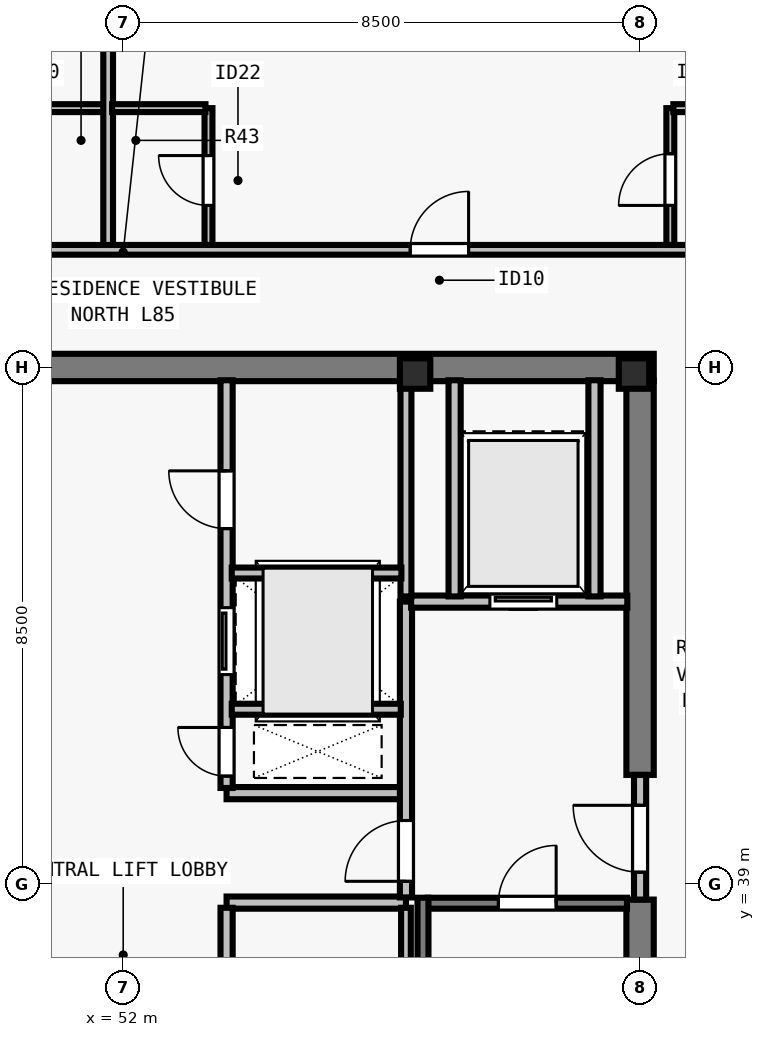
"""IFC4 building model, lengths in metres.
Left out: names, types, materials, properties, quantities, classifications, styles, units other than length and angle.
Written with IfcOpenShell. Run it as: python <this file> out.ifc"""

import sys

from ifc_helpers import new_model, si_unit, direction, frame, frame_2d, origin, origin_2d, place, context, subcontext, project, spatial, rectangle, i_section, extrude, element, fill, save


model = new_model("IFC4")
c1 = context("Model", 3, precision=1e-05, world=origin(), true_north=direction((0.0, 1.0)))
c2 = subcontext(c1, "Body", "Model", "MODEL_VIEW")
j1 = project(units=[si_unit("LENGTHUNIT", "METRE"), si_unit("PLANEANGLEUNIT", "RADIAN")], contexts=[c1])
p1 = place(None, origin())
s1 = spatial("IfcSite", under=j1, at=p1, CompositionType="ELEMENT")
p2 = place(p1, origin())
s2 = spatial("IfcBuilding", under=s1, at=p2, CompositionType="ELEMENT")
p3 = place(p2, frame((0.0, 0.0, 308.5)))
s3 = spatial("IfcBuildingStorey", under=s2, at=p3, CompositionType="ELEMENT", Elevation=308.5)
for number, where, z_axis, x_axis in (
    (1, (56.8, 47.4, 0.0), (0.0, 0.0, 1.0), (1.0, 0.0, 0.0)),
    (2, (60.4, 47.4, 0.0), (0.0, 0.0, 1.0), (1.0, 0.0, 0.0)),
):
    element("IfcColumn", number, at=place(p3, frame(where, z_axis=z_axis, x_axis=x_axis)), inside=s3, PredefinedType="COLUMN", context=c2, shape_type="SweptSolid", body=[
        extrude(i_section(OverallWidth=0.5, OverallDepth=0.5, WebThickness=0.028, FlangeThickness=0.045, at=origin_2d()), origin(), (0.0, 0.0, 1.0), 3.5),
    ])
p4 = place(p3, frame((43.275, 47.5, 0.0), z_axis=(0.0, 0.0, 1.0), x_axis=(1.0, 0.0, 0.0)))
e3 = element("IfcWall", 3, at=p4, inside=s3, PredefinedType="SHEAR", context=c2, shape_type="SweptSolid", body=[
    extrude(rectangle(XDim=17.45, YDim=0.45, at=frame_2d((8.725, 0.0))), origin(), (0.0, 0.0, 1.0), 3.29),
])
p5 = place(p3, frame((60.5, 30.715, 0.0), z_axis=(0.0, 0.0, 1.0), x_axis=(0.0, 1.0, 0.0)))
e4 = element("IfcWall", 4, at=p5, inside=s3, PredefinedType="SHEAR", context=c2, shape_type="SweptSolid", body=[
    extrude(rectangle(XDim=8.035, YDim=0.45, at=frame_2d((4.018, 0.0))), origin(), (0.0, 0.0, 1.0), 3.29),
])
p6 = place(p3, frame((60.5, 40.8, 0.0), z_axis=(0.0, 0.0, 1.0), x_axis=(0.0, 1.0, 0.0)))
e5 = element("IfcWall", 5, at=p6, inside=s3, PredefinedType="SHEAR", context=c2, shape_type="SweptSolid", body=[
    extrude(rectangle(XDim=6.485, YDim=0.45, at=frame_2d((3.242, 0.0))), origin(), (0.0, 0.0, 1.0), 3.29),
])
for number, where, z_axis, x_axis in (
    (6, (53.7, 38.7, 0.0), (0.0, 0.0, 1.0), (1.0, 0.0, 0.0)),
    (7, (53.7, 40.5, 0.0), (0.0, 0.0, 1.0), (1.0, 0.0, 0.0)),
):
    element("IfcWall", number, at=place(p3, frame(where, z_axis=z_axis, x_axis=x_axis)), inside=s3, PredefinedType="SOLIDWALL", context=c2, shape_type="SweptSolid", body=[
        extrude(rectangle(XDim=2.95, YDim=0.2, at=frame_2d((1.475, 0.0))), origin(), (0.0, 0.0, 1.0), 3.29),
    ])
p7 = place(p3, frame((53.7, 30.71, 0.0), z_axis=(0.0, 0.0, 1.0), x_axis=(0.0, 1.0, 0.0)))
e8 = element("IfcWall", 8, at=p7, inside=s3, PredefinedType="SOLIDWALL", context=c2, shape_type="SweptSolid", body=[
    extrude(rectangle(XDim=7.905, YDim=0.2, at=frame_2d((3.953, 0.0))), origin(), (0.0, 0.0, 1.0), 3.29),
])
p8 = place(p7, frame((3.14, 0.0, 0.0)))
e9 = element("IfcOpeningElement", 9, at=p8, cuts=e8, PredefinedType="OPENING", context=c2, shape_type="SweptSolid", body=[
    extrude(rectangle(XDim=0.9, YDim=2.12, at=frame_2d((0.45, 1.06))), frame((0.0, 0.11, 0.0), z_axis=(0.0, -1.0, 0.0), x_axis=(1.0, 0.0, 0.0)), (0.0, 0.0, 1.0), 0.22),
])
p9 = place(p3, frame((53.7, 40.585, 0.0), z_axis=(0.0, 0.0, 1.0), x_axis=(0.0, 1.0, 0.0)))
e10 = element("IfcWall", 10, at=p9, inside=s3, PredefinedType="SOLIDWALL", context=c2, shape_type="SweptSolid", body=[
    extrude(rectangle(XDim=6.705, YDim=0.2, at=frame_2d((3.353, 0.0))), origin(), (0.0, 0.0, 1.0), 3.29),
])
p10 = place(p9, frame((0.195, 0.0, 0.0)))
e11 = element("IfcOpeningElement", 11, at=p10, cuts=e10, PredefinedType="OPENING", context=c2, shape_type="SweptSolid", body=[
    extrude(rectangle(XDim=0.8, YDim=2.08, at=frame_2d((0.4, 1.04))), frame((0.0, 0.11, 0.0), z_axis=(0.0, -1.0, 0.0), x_axis=(1.0, 0.0, 0.0)), (0.0, 0.0, 1.0), 0.22),
])
p11 = place(p9, frame((1.865, 0.0, 0.0)))
e12 = element("IfcOpeningElement", 12, at=p11, cuts=e10, PredefinedType="OPENING", context=c2, shape_type="SweptSolid", body=[
    extrude(rectangle(XDim=1.1, YDim=2.2, at=frame_2d((0.55, 1.1))), frame((0.0, 0.11, 0.0), z_axis=(0.0, -1.0, 0.0), x_axis=(1.0, 0.0, 0.0)), (0.0, 0.0, 1.0), 0.22),
])
p12 = place(p9, frame((4.265, 0.0, 0.0)))
e13 = element("IfcOpeningElement", 13, at=p12, cuts=e10, PredefinedType="OPENING", context=c2, shape_type="SweptSolid", body=[
    extrude(rectangle(XDim=0.95, YDim=2.12, at=frame_2d((0.475, 1.06))), frame((0.0, 0.11, 0.0), z_axis=(0.0, -1.0, 0.0), x_axis=(1.0, 0.0, 0.0)), (0.0, 0.0, 1.0), 0.22),
])
p13 = place(p3, frame((60.5, 38.75, 0.0), z_axis=(0.0, 0.0, 1.0), x_axis=(0.0, 1.0, 0.0)))
e14 = element("IfcWall", 14, at=p13, inside=s3, PredefinedType="SOLIDWALL", context=c2, shape_type="SweptSolid", body=[
    extrude(rectangle(XDim=2.05, YDim=0.2, at=frame_2d((1.025, 0.0))), origin(), (0.0, 0.0, 1.0), 3.29),
])
p14 = place(p13, frame((0.45, 0.0, 0.0)))
e15 = element("IfcOpeningElement", 15, at=p14, cuts=e14, PredefinedType="OPENING", context=c2, shape_type="SweptSolid", body=[
    extrude(rectangle(XDim=1.1, YDim=2.15, at=frame_2d((0.55, 1.075))), frame((0.0, 0.11, 0.0), z_axis=(0.0, -1.0, 0.0), x_axis=(1.0, 0.0, 0.0)), (0.0, 0.0, 1.0), 0.22),
])
p15 = place(p3, frame((56.65, 38.785, 0.0), z_axis=(0.0, 0.0, 1.0), x_axis=(0.0, 1.0, 0.0)))
e16 = element("IfcWall", 16, at=p15, inside=s3, PredefinedType="SOLIDWALL", context=c2, shape_type="SweptSolid", body=[
    extrude(rectangle(XDim=4.865, YDim=0.2, at=frame_2d((2.433, 0.0))), origin(), (0.0, 0.0, 1.0), 3.29),
])
p16 = place(p15, frame((0.265, 0.0, 0.0)))
e17 = element("IfcOpeningElement", 17, at=p16, cuts=e16, PredefinedType="OPENING", context=c2, shape_type="SweptSolid", body=[
    extrude(rectangle(XDim=1.0, YDim=2.15, at=frame_2d((0.5, 1.075))), frame((0.0, 0.11, 0.0), z_axis=(0.0, -1.0, 0.0), x_axis=(1.0, 0.0, 0.0)), (0.0, 0.0, 1.0), 0.22),
])
p17 = place(p3, frame((56.735, 43.65, 0.0), z_axis=(0.0, 0.0, 1.0), x_axis=(1.0, 0.0, 0.0)))
e18 = element("IfcWall", 18, at=p17, inside=s3, PredefinedType="SOLIDWALL", context=c2, shape_type="SweptSolid", body=[
    extrude(rectangle(XDim=3.555, YDim=0.2, at=frame_2d((1.777, 0.0))), origin(), (0.0, 0.0, 1.0), 3.29),
])
p18 = place(p17, frame((1.295, 0.0, 0.0)))
e19 = element("IfcOpeningElement", 19, at=p18, cuts=e18, PredefinedType="OPENING", context=c2, shape_type="SweptSolid", body=[
    extrude(rectangle(XDim=1.1, YDim=2.2, at=frame_2d((0.55, 1.1))), frame((0.0, 0.11, 0.0), z_axis=(0.0, -1.0, 0.0), x_axis=(1.0, 0.0, 0.0)), (0.0, 0.0, 1.0), 0.22),
])
for number, where, z_axis, x_axis in (
    (20, (57.45, 43.735, 0.0), (0.0, 0.0, 1.0), (0.0, 1.0, 0.0)),
    (21, (59.75, 43.735, 0.0), (0.0, 0.0, 1.0), (0.0, 1.0, 0.0)),
):
    element("IfcWall", number, at=place(p3, frame(where, z_axis=z_axis, x_axis=x_axis)), inside=s3, PredefinedType="SOLIDWALL", context=c2, shape_type="SweptSolid", body=[
        extrude(rectangle(XDim=3.555, YDim=0.2, at=frame_2d((1.777, 0.0))), origin(), (0.0, 0.0, 1.0), 3.29),
    ])
p19 = place(p3, frame((56.65, 30.71, 0.0), z_axis=(0.0, 0.0, 1.0), x_axis=(0.0, 1.0, 0.0)))
e22 = element("IfcWall", 22, at=p19, inside=s3, PredefinedType="PARTITIONING", context=c2, shape_type="SweptSolid", body=[
    extrude(rectangle(XDim=7.905, YDim=0.16, at=frame_2d((3.953, 0.0))), origin(), (0.0, 0.0, 1.0), 3.29),
])
p20 = place(p3, frame((56.65, 43.735, 0.0), z_axis=(0.0, 0.0, 1.0), x_axis=(0.0, 1.0, 0.0)))
e23 = element("IfcWall", 23, at=p20, inside=s3, PredefinedType="SOLIDWALL", context=c2, shape_type="SweptSolid", body=[
    extrude(rectangle(XDim=3.555, YDim=0.18, at=frame_2d((1.777, 0.0))), origin(), (0.0, 0.0, 1.0), 3.29),
])
p21 = place(p3, frame((53.785, 41.88, 0.0), z_axis=(0.0, 0.0, 1.0), x_axis=(1.0, 0.0, 0.0)))
e24 = element("IfcWall", 24, at=p21, inside=s3, PredefinedType="SOLIDWALL", context=c2, shape_type="SweptSolid", body=[
    extrude(rectangle(XDim=2.78, YDim=0.18, at=frame_2d((1.39, 0.0))), origin(), (0.0, 0.0, 1.0), 3.29),
])
p22 = place(p3, frame((53.785, 44.12, 0.0), z_axis=(0.0, 0.0, 1.0), x_axis=(1.0, 0.0, 0.0)))
e25 = element("IfcWall", 25, at=p22, inside=s3, PredefinedType="SOLIDWALL", context=c2, shape_type="SweptSolid", body=[
    extrude(rectangle(XDim=2.79, YDim=0.18, at=frame_2d((1.395, 0.0))), origin(), (0.0, 0.0, 1.0), 3.29),
])
p23 = place(p3, frame((31.285, 49.435, 0.0), z_axis=(0.0, 0.0, 1.0), x_axis=(1.0, 0.0, 0.0)))
e26 = element("IfcWall", 26, at=p23, inside=s3, PredefinedType="PARTITIONING", context=c2, shape_type="SweptSolid", body=[
    extrude(rectangle(XDim=41.43, YDim=0.16, at=frame_2d((20.715, 0.0))), origin(), (0.0, 0.0, 1.0), 3.009),
])
p24 = place(p23, frame((4.979, 0.0, 0.0)))
e27 = element("IfcOpeningElement", 27, at=p24, cuts=e26, PredefinedType="OPENING", context=c2, shape_type="SweptSolid", body=[
    extrude(rectangle(XDim=0.96, YDim=2.18, at=frame_2d((0.48, 1.09))), frame((0.0, 0.09, 0.0), z_axis=(0.0, -1.0, 0.0), x_axis=(1.0, 0.0, 0.0)), (0.0, 0.0, 1.0), 0.18),
])
p25 = place(p23, frame((15.145, 0.0, 0.0)))
e28 = element("IfcOpeningElement", 28, at=p25, cuts=e26, PredefinedType="OPENING", context=c2, shape_type="SweptSolid", body=[
    extrude(rectangle(XDim=0.96, YDim=2.18, at=frame_2d((0.48, 1.09))), frame((0.0, 0.09, 0.0), z_axis=(0.0, -1.0, 0.0), x_axis=(1.0, 0.0, 0.0)), (0.0, 0.0, 1.0), 0.18),
])
p26 = place(p23, frame((25.435, 0.0, 0.0)))
e29 = element("IfcOpeningElement", 29, at=p26, cuts=e26, PredefinedType="OPENING", context=c2, shape_type="SweptSolid", body=[
    extrude(rectangle(XDim=0.96, YDim=2.18, at=frame_2d((0.48, 1.09))), frame((0.0, 0.09, 0.0), z_axis=(0.0, -1.0, 0.0), x_axis=(1.0, 0.0, 0.0)), (0.0, 0.0, 1.0), 0.18),
])
p27 = place(p23, frame((35.849, 0.0, 0.0)))
e30 = element("IfcOpeningElement", 30, at=p27, cuts=e26, PredefinedType="OPENING", context=c2, shape_type="SweptSolid", body=[
    extrude(rectangle(XDim=0.96, YDim=2.18, at=frame_2d((0.48, 1.09))), frame((0.0, 0.09, 0.0), z_axis=(0.0, -1.0, 0.0), x_axis=(1.0, 0.0, 0.0)), (0.0, 0.0, 1.0), 0.18),
])
p28 = place(p3, frame((50.153, 51.765, 0.0), z_axis=(0.0, 0.0, 1.0), x_axis=(1.0, 0.0, 0.0)))
e31 = element("IfcWall", 31, at=p28, inside=s3, PredefinedType="PLUMBINGWALL", context=c2, shape_type="SweptSolid", body=[
    extrude(rectangle(XDim=1.6, YDim=0.13, at=frame_2d((0.8, 0.0))), origin(), (0.0, 0.0, 1.0), 3.29),
])
p29 = place(p3, frame((51.752, 49.515, 0.0), z_axis=(0.0, 0.0, 1.0), x_axis=(0.0, 1.0, 0.0)))
e32 = element("IfcWall", 32, at=p29, inside=s3, PredefinedType="PARTITIONING", context=c2, shape_type="SweptSolid", body=[
    extrude(rectangle(XDim=10.185, YDim=0.16, at=frame_2d((5.093, 0.0))), origin(), (0.0, 0.0, 1.0), 3.009),
])
p30 = place(p3, frame((53.403, 49.515, 0.0), z_axis=(0.0, 0.0, 1.0), x_axis=(0.0, 1.0, 0.0)))
e33 = element("IfcWall", 33, at=p30, inside=s3, PredefinedType="PLUMBINGWALL", context=c2, shape_type="SweptSolid", body=[
    extrude(rectangle(XDim=2.25, YDim=0.13, at=frame_2d((1.125, 0.0))), origin(), (0.0, 0.0, 1.0), 3.29),
])
p31 = place(p30, frame((0.65, 0.0, 0.0)))
e34 = element("IfcOpeningElement", 34, at=p31, cuts=e33, PredefinedType="OPENING", context=c2, shape_type="SweptSolid", body=[
    extrude(rectangle(XDim=0.82, YDim=2.1, at=frame_2d((0.41, 1.05))), frame((0.0, 0.075, 0.0), z_axis=(0.0, -1.0, 0.0), x_axis=(1.0, 0.0, 0.0)), (0.0, 0.0, 1.0), 0.15),
])
p32 = place(p3, frame((51.817, 51.765, 0.0), z_axis=(0.0, 0.0, 1.0), x_axis=(1.0, 0.0, 0.0)))
e35 = element("IfcWall", 35, at=p32, inside=s3, PredefinedType="PLUMBINGWALL", context=c2, shape_type="SweptSolid", body=[
    extrude(rectangle(XDim=1.535, YDim=0.13, at=frame_2d((0.768, 0.0))), origin(), (0.0, 0.0, 1.0), 3.29),
])
p33 = place(p3, frame((60.998, 49.515, 0.0), z_axis=(0.0, 0.0, 1.0), x_axis=(0.0, 1.0, 0.0)))
e36 = element("IfcWall", 36, at=p33, inside=s3, PredefinedType="PLUMBINGWALL", context=c2, shape_type="SweptSolid", body=[
    extrude(rectangle(XDim=2.25, YDim=0.13, at=frame_2d((1.125, 0.0))), origin(), (0.0, 0.0, 1.0), 3.29),
])
p34 = place(p33, frame((0.65, 0.0, 0.0)))
e37 = element("IfcOpeningElement", 37, at=p34, cuts=e36, PredefinedType="OPENING", context=c2, shape_type="SweptSolid", body=[
    extrude(rectangle(XDim=0.85, YDim=2.1, at=frame_2d((0.425, 1.05))), frame((0.0, 0.075, 0.0), z_axis=(0.0, -1.0, 0.0), x_axis=(1.0, 0.0, 0.0)), (0.0, 0.0, 1.0), 0.15),
])
p35 = place(p3, frame((61.048, 51.765, 0.0), z_axis=(0.0, 0.0, 1.0), x_axis=(1.0, 0.0, 0.0)))
e38 = element("IfcWall", 38, at=p35, inside=s3, PredefinedType="PLUMBINGWALL", context=c2, shape_type="SweptSolid", body=[
    extrude(rectangle(XDim=1.6, YDim=0.13, at=frame_2d((0.8, 0.0))), origin(), (0.0, 0.0, 1.0), 3.29),
])
p36 = place(p3, frame((57.005, 38.69, 0.0), z_axis=(0.0, 0.0, 1.0), x_axis=(1.0, 0.0, 0.0)))
e39 = element("IfcWall", 39, at=p36, inside=s3, PredefinedType="SOLIDWALL", context=c2, shape_type="SweptSolid", body=[
    extrude(rectangle(XDim=3.28, YDim=0.18, at=frame_2d((1.64, 0.0))), origin(), (0.0, 0.0, 1.0), 3.29),
])
p37 = place(p36, frame((1.165, 0.0, 0.0)))
e40 = element("IfcOpeningElement", 40, at=p37, cuts=e39, PredefinedType="OPENING", context=c2, shape_type="SweptSolid", body=[
    extrude(rectangle(XDim=0.95, YDim=2.15, at=frame_2d((0.475, 1.075))), frame((0.0, 0.1, 0.0), z_axis=(0.0, -1.0, 0.0), x_axis=(1.0, 0.0, 0.0)), (0.0, 0.0, 1.0), 0.2),
])
p38 = place(p3, frame((56.93, 38.78, 0.0), z_axis=(0.0, 0.0, 1.0), x_axis=(0.0, -1.0, 0.0)))
e41 = element("IfcWall", 41, at=p38, inside=s3, PredefinedType="SOLIDWALL", context=c2, shape_type="SweptSolid", body=[
    extrude(rectangle(XDim=8.067, YDim=0.18, at=frame_2d((4.034, 0.0))), origin(), (0.0, 0.0, 1.0), 3.29),
])
p39 = place(p14, origin())
e42 = element("IfcDoor", 42, at=p39, inside=s3, OperationType="SINGLE_SWING_RIGHT", PredefinedType="DOOR", context=c2, shape_type="SweptSolid", body=[
    extrude(rectangle(XDim=1.1, YDim=2.15, at=frame_2d((0.55, 1.075))), frame((0.0, 0.025, 0.0), z_axis=(0.0, -1.0, 0.0), x_axis=(1.0, 0.0, 0.0)), (0.0, 0.0, 1.0), 0.05),
])
fill(e15, e42)
p40 = place(p16, origin())
e43 = element("IfcDoor", 43, at=p40, inside=s3, OperationType="SINGLE_SWING_LEFT", PredefinedType="DOOR", context=c2, shape_type="SweptSolid", body=[
    extrude(rectangle(XDim=1.0, YDim=2.15, at=frame_2d((0.5, 1.075))), frame((0.0, 0.025, 0.0), z_axis=(0.0, -1.0, 0.0), x_axis=(1.0, 0.0, 0.0)), (0.0, 0.0, 1.0), 0.05),
])
fill(e17, e43)
p41 = place(p18, origin())
e44 = element("IfcDoor", 44, at=p41, inside=s3, OperationType="SLIDING_TO_LEFT", PredefinedType="DOOR", context=c2, shape_type="SweptSolid", body=[
    extrude(rectangle(XDim=1.1, YDim=2.2, at=frame_2d((0.55, 1.1))), frame((0.0, 0.025, 0.0), z_axis=(0.0, -1.0, 0.0), x_axis=(1.0, 0.0, 0.0)), (0.0, 0.0, 1.0), 0.05),
])
fill(e19, e44)
p42 = place(p10, origin())
e45 = element("IfcDoor", 45, at=p42, inside=s3, OperationType="SINGLE_SWING_RIGHT", PredefinedType="DOOR", context=c2, shape_type="SweptSolid", body=[
    extrude(rectangle(XDim=0.8, YDim=2.08, at=frame_2d((0.4, 1.04))), frame((0.0, 0.025, 0.0), z_axis=(0.0, -1.0, 0.0), x_axis=(1.0, 0.0, 0.0)), (0.0, 0.0, 1.0), 0.05),
])
fill(e11, e45)
p43 = place(p11, origin())
e46 = element("IfcDoor", 46, at=p43, inside=s3, OperationType="SLIDING_TO_LEFT", PredefinedType="DOOR", context=c2, shape_type="SweptSolid", body=[
    extrude(rectangle(XDim=1.1, YDim=2.2, at=frame_2d((0.55, 1.1))), frame((0.0, 0.025, 0.0), z_axis=(0.0, -1.0, 0.0), x_axis=(1.0, 0.0, 0.0)), (0.0, 0.0, 1.0), 0.05),
])
fill(e12, e46)
p44 = place(p12, origin())
e47 = element("IfcDoor", 47, at=p44, inside=s3, OperationType="SINGLE_SWING_RIGHT", PredefinedType="DOOR", context=c2, shape_type="SweptSolid", body=[
    extrude(rectangle(XDim=0.95, YDim=2.12, at=frame_2d((0.475, 1.06))), frame((0.0, 0.025, 0.0), z_axis=(0.0, -1.0, 0.0), x_axis=(1.0, 0.0, 0.0)), (0.0, 0.0, 1.0), 0.05),
])
fill(e13, e47)
p45 = place(p31, origin())
e48 = element("IfcDoor", 48, at=p45, inside=s3, OperationType="SINGLE_SWING_RIGHT", PredefinedType="DOOR", context=c2, shape_type="SweptSolid", body=[
    extrude(rectangle(XDim=0.82, YDim=2.1, at=frame_2d((0.41, 1.05))), frame((0.0, 0.025, 0.0), z_axis=(0.0, -1.0, 0.0), x_axis=(1.0, 0.0, 0.0)), (0.0, 0.0, 1.0), 0.05),
])
fill(e34, e48)
p46 = place(p34, origin())
e49 = element("IfcDoor", 49, at=p46, inside=s3, OperationType="SINGLE_SWING_LEFT", PredefinedType="DOOR", context=c2, shape_type="SweptSolid", body=[
    extrude(rectangle(XDim=0.85, YDim=2.1, at=frame_2d((0.425, 1.05))), frame((0.0, 0.025, 0.0), z_axis=(0.0, -1.0, 0.0), x_axis=(1.0, 0.0, 0.0)), (0.0, 0.0, 1.0), 0.05),
])
fill(e37, e49)
p47 = place(p26, origin())
e50 = element("IfcDoor", 50, at=p47, inside=s3, OperationType="SINGLE_SWING_RIGHT", PredefinedType="DOOR", context=c2, shape_type="SweptSolid", body=[
    extrude(rectangle(XDim=0.96, YDim=2.18, at=frame_2d((0.48, 1.09))), frame((0.0, 0.025, 0.0), z_axis=(0.0, -1.0, 0.0), x_axis=(1.0, 0.0, 0.0)), (0.0, 0.0, 1.0), 0.05),
])
fill(e29, e50)
p48 = place(p37, origin())
e51 = element("IfcDoor", 51, at=p48, inside=s3, OperationType="SINGLE_SWING_RIGHT", PredefinedType="DOOR", context=c2, shape_type="SweptSolid", body=[
    extrude(rectangle(XDim=0.95, YDim=2.15, at=frame_2d((0.475, 1.075))), frame((0.0, 0.025, 0.0), z_axis=(0.0, -1.0, 0.0), x_axis=(1.0, 0.0, 0.0)), (0.0, 0.0, 1.0), 0.05),
])
fill(e40, e51)
save(model, sys.argv[1])
